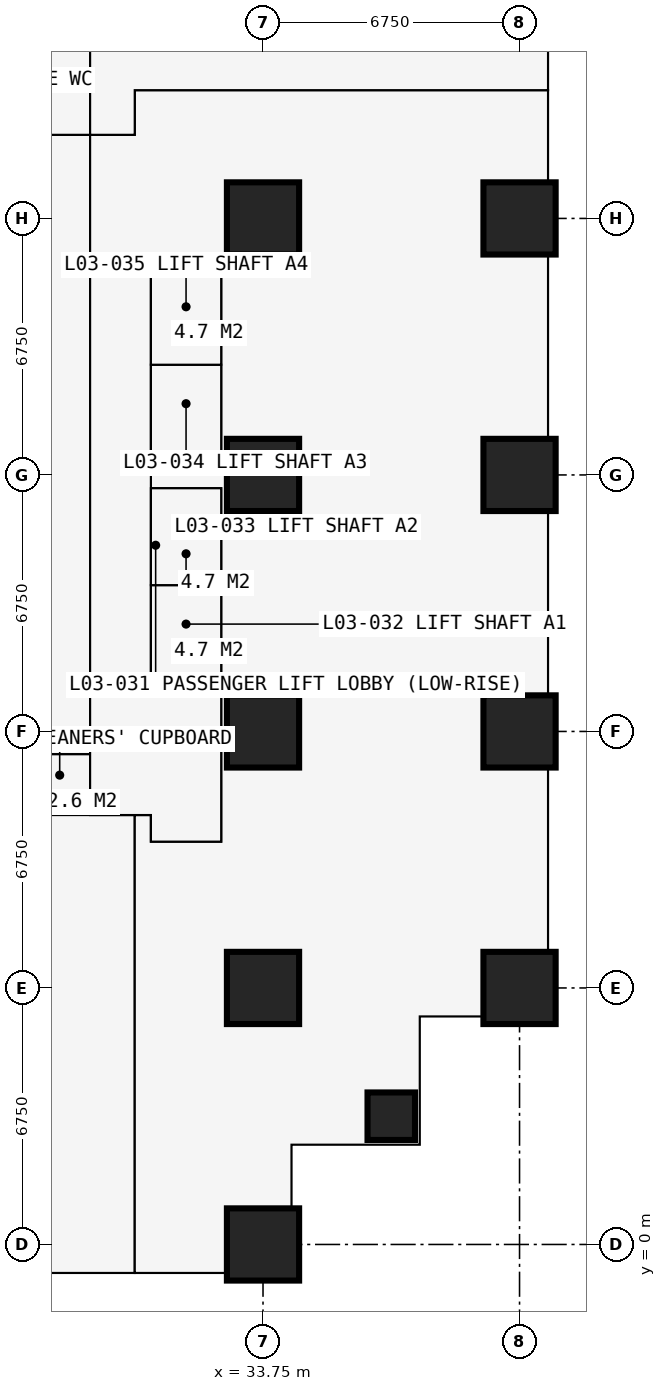
"""IFC4 building model, lengths in metres.
Left out: names, types, materials, properties, quantities, classifications, styles, units other than length and angle.
Written with IfcOpenShell. Run it as: python <this file> out.ifc"""

import sys

from ifc_helpers import new_model, si_unit, direction, frame, frame_2d, origin, origin_2d, place, context, subcontext, project, spatial, rectangle, extrude, element, fill, save


model = new_model("IFC4")
c1 = context("Model", 3, precision=1e-05, world=origin(), true_north=direction((0.0, 1.0)))
c2 = subcontext(c1, "Body", "Model", "MODEL_VIEW")
j1 = project(units=[si_unit("LENGTHUNIT", "METRE"), si_unit("PLANEANGLEUNIT", "RADIAN")], contexts=[c1])
p1 = place(None, origin())
s1 = spatial("IfcSite", under=j1, at=p1, CompositionType="ELEMENT")
p2 = place(p1, origin())
s2 = spatial("IfcBuilding", under=s1, at=p2, CompositionType="ELEMENT")
p3 = place(p2, frame((0.0, 0.0, 13.5)))
s3 = spatial("IfcBuildingStorey", under=s2, at=p3, CompositionType="ELEMENT", Elevation=13.5)
for number, where, z_axis, x_axis in (
    (1, (33.75, 0.0, 0.0), (0.0, 0.0, 1.0), (1.0, 0.0, 0.0)),
    (2, (33.75, 6.75, 0.0), (0.0, 0.0, 1.0), (1.0, 0.0, 0.0)),
    (3, (33.75, 13.5, 0.0), (0.0, 0.0, 1.0), (1.0, 0.0, 0.0)),
    (4, (33.75, 20.25, 0.0), (0.0, 0.0, 1.0), (1.0, 0.0, 0.0)),
    (5, (33.75, 27.0, 0.0), (0.0, 0.0, 1.0), (1.0, 0.0, 0.0)),
):
    element("IfcColumn", number, at=place(p3, frame(where, z_axis=z_axis, x_axis=x_axis)), inside=s3, PredefinedType="COLUMN", context=c2, shape_type="SweptSolid", body=[
        extrude(rectangle(XDim=1.9, YDim=1.9, at=origin_2d()), origin(), (0.0, 0.0, 1.0), 4.5),
    ])
p4 = place(p3, frame((37.125, 3.375, 0.0), z_axis=(0.0, 0.0, 1.0), x_axis=(1.0, 0.0, 0.0)))
e6 = element("IfcColumn", 6, at=p4, inside=s3, PredefinedType="COLUMN", context=c2, shape_type="SweptSolid", body=[
    extrude(rectangle(XDim=1.25, YDim=1.25, at=origin_2d()), origin(), (0.0, 0.0, 1.0), 4.5),
])
for number, where, z_axis, x_axis in (
    (7, (40.5, 6.75, 0.0), (0.0, 0.0, 1.0), (1.0, 0.0, 0.0)),
    (8, (40.5, 13.5, 0.0), (0.0, 0.0, 1.0), (1.0, 0.0, 0.0)),
    (9, (40.5, 20.25, 0.0), (0.0, 0.0, 1.0), (1.0, 0.0, 0.0)),
    (10, (40.5, 27.0, 0.0), (0.0, 0.0, 1.0), (1.0, 0.0, 0.0)),
):
    element("IfcColumn", number, at=place(p3, frame(where, z_axis=z_axis, x_axis=x_axis)), inside=s3, PredefinedType="COLUMN", context=c2, shape_type="SweptSolid", body=[
        extrude(rectangle(XDim=1.9, YDim=1.9, at=origin_2d()), origin(), (0.0, 0.0, 1.0), 4.5),
    ])
p5 = place(p3, frame((41.25, 27.0, 0.0), z_axis=(0.0, 0.0, 1.0), x_axis=(0.0, -1.0, 0.0)))
e11 = element("IfcWall", 11, at=p5, inside=s3, PredefinedType="SOLIDWALL", context=c2, shape_type="SweptSolid", body=[
    extrude(rectangle(XDim=6.75, YDim=0.15, at=frame_2d((3.375, 0.0))), origin(), (0.0, 0.0, 1.0), 4.275),
])
p6 = place(p5, frame((0.962, 0.0, 0.0)))
e12 = element("IfcOpeningElement", 12, at=p6, cuts=e11, PredefinedType="OPENING", context=c2, shape_type="SweptSolid", body=[
    extrude(rectangle(XDim=2.4, YDim=2.4, at=frame_2d((1.2, 1.2))), frame((0.0, 0.085, 0.0), z_axis=(0.0, -1.0, 0.0), x_axis=(1.0, 0.0, 0.0)), (0.0, 0.0, 1.0), 0.17),
])
p7 = place(p5, frame((3.387, 0.0, 0.0)))
e13 = element("IfcOpeningElement", 13, at=p7, cuts=e11, PredefinedType="OPENING", context=c2, shape_type="SweptSolid", body=[
    extrude(rectangle(XDim=2.4, YDim=2.4, at=frame_2d((1.2, 1.2))), frame((0.0, 0.085, 0.0), z_axis=(0.0, -1.0, 0.0), x_axis=(1.0, 0.0, 0.0)), (0.0, 0.0, 1.0), 0.17),
])
p8 = place(p3, frame((34.5, -0.75, 0.0), z_axis=(0.0, 0.0, 1.0), x_axis=(0.0, 1.0, 0.0)))
e14 = element("IfcWall", 14, at=p8, inside=s3, PredefinedType="SOLIDWALL", context=c2, shape_type="SweptSolid", body=[
    extrude(rectangle(XDim=3.375, YDim=0.3, at=frame_2d((1.688, 0.0))), origin(), (0.0, 0.0, 1.0), 4.275),
])
p9 = place(p8, frame((1.857, 0.0, 0.9)))
e15 = element("IfcOpeningElement", 15, at=p9, cuts=e14, PredefinedType="OPENING", context=c2, shape_type="SweptSolid", body=[
    extrude(rectangle(XDim=1.2, YDim=1.8, at=frame_2d((0.6, 0.9))), frame((0.0, 0.16, 0.0), z_axis=(0.0, -1.0, 0.0), x_axis=(1.0, 0.0, 0.0)), (0.0, 0.0, 1.0), 0.32),
])
p10 = place(p3, frame((34.5, 2.625, 0.0), z_axis=(0.0, 0.0, 1.0), x_axis=(1.0, 0.0, 0.0)))
e16 = element("IfcWall", 16, at=p10, inside=s3, PredefinedType="SOLIDWALL", context=c2, shape_type="SweptSolid", body=[
    extrude(rectangle(XDim=3.375, YDim=0.3, at=frame_2d((1.688, 0.0))), origin(), (0.0, 0.0, 1.0), 4.275),
])
p11 = place(p10, frame((0.938, 0.0, 0.9)))
e17 = element("IfcOpeningElement", 17, at=p11, cuts=e16, PredefinedType="OPENING", context=c2, shape_type="SweptSolid", body=[
    extrude(rectangle(XDim=1.5, YDim=1.8, at=frame_2d((0.75, 0.9))), frame((0.0, 0.16, 0.0), z_axis=(0.0, -1.0, 0.0), x_axis=(1.0, 0.0, 0.0)), (0.0, 0.0, 1.0), 0.32),
])
p12 = place(p3, frame((37.875, 2.625, 0.0), z_axis=(0.0, 0.0, 1.0), x_axis=(0.0, 1.0, 0.0)))
e18 = element("IfcWall", 18, at=p12, inside=s3, PredefinedType="SOLIDWALL", context=c2, shape_type="SweptSolid", body=[
    extrude(rectangle(XDim=3.375, YDim=0.3, at=frame_2d((1.688, 0.0))), origin(), (0.0, 0.0, 1.0), 4.275),
])
p13 = place(p12, frame((0.938, 0.0, 0.9)))
e19 = element("IfcOpeningElement", 19, at=p13, cuts=e18, PredefinedType="OPENING", context=c2, shape_type="SweptSolid", body=[
    extrude(rectangle(XDim=1.5, YDim=1.8, at=frame_2d((0.75, 0.9))), frame((0.0, 0.16, 0.0), z_axis=(0.0, -1.0, 0.0), x_axis=(1.0, 0.0, 0.0)), (0.0, 0.0, 1.0), 0.32),
])
p14 = place(p3, frame((37.875, 6.0, 0.0), z_axis=(0.0, 0.0, 1.0), x_axis=(1.0, 0.0, 0.0)))
e20 = element("IfcWall", 20, at=p14, inside=s3, PredefinedType="SOLIDWALL", context=c2, shape_type="SweptSolid", body=[
    extrude(rectangle(XDim=3.375, YDim=0.3, at=frame_2d((1.688, 0.0))), origin(), (0.0, 0.0, 1.0), 4.275),
])
p15 = place(p14, frame((0.317, 0.0, 0.9)))
e21 = element("IfcOpeningElement", 21, at=p15, cuts=e20, PredefinedType="OPENING", context=c2, shape_type="SweptSolid", body=[
    extrude(rectangle(XDim=1.2, YDim=1.8, at=frame_2d((0.6, 0.9))), frame((0.0, 0.16, 0.0), z_axis=(0.0, -1.0, 0.0), x_axis=(1.0, 0.0, 0.0)), (0.0, 0.0, 1.0), 0.32),
])
p16 = place(p3, frame((8.9, 29.2, 0.0), z_axis=(0.0, 0.0, 1.0), x_axis=(1.0, 0.0, 0.0)))
e22 = element("IfcWall", 22, at=p16, inside=s3, PredefinedType="PARTITIONING", context=c2, shape_type="SweptSolid", body=[
    extrude(rectangle(XDim=21.475, YDim=0.15, at=frame_2d((10.738, 0.0))), origin(), (0.0, 0.0, 1.0), 4.275),
])
p17 = place(p16, frame((16.65, 0.0, 0.0)))
e23 = element("IfcOpeningElement", 23, at=p17, cuts=e22, PredefinedType="OPENING", context=c2, shape_type="SweptSolid", body=[
    extrude(rectangle(XDim=1.0, YDim=2.2, at=frame_2d((0.5, 1.1))), frame((0.0, 0.085, 0.0), z_axis=(0.0, -1.0, 0.0), x_axis=(1.0, 0.0, 0.0)), (0.0, 0.0, 1.0), 0.17),
])
p18 = place(p16, frame((18.75, 0.0, 0.0)))
e24 = element("IfcOpeningElement", 24, at=p18, cuts=e22, PredefinedType="OPENING", context=c2, shape_type="SweptSolid", body=[
    extrude(rectangle(XDim=1.0, YDim=2.2, at=frame_2d((0.5, 1.1))), frame((0.0, 0.085, 0.0), z_axis=(0.0, -1.0, 0.0), x_axis=(1.0, 0.0, 0.0)), (0.0, 0.0, 1.0), 0.17),
])
p19 = place(p16, frame((8.45, 0.0, 0.0)))
e25 = element("IfcOpeningElement", 25, at=p19, cuts=e22, PredefinedType="OPENING", context=c2, shape_type="SweptSolid", body=[
    extrude(rectangle(XDim=1.6, YDim=2.4, at=frame_2d((0.8, 1.2))), frame((0.0, 0.085, 0.0), z_axis=(0.0, -1.0, 0.0), x_axis=(1.0, 0.0, 0.0)), (0.0, 0.0, 1.0), 0.17),
])
p20 = place(p3, frame((10.125, 11.3, 0.0), z_axis=(0.0, 0.0, 1.0), x_axis=(1.0, 0.0, 0.0)))
e26 = element("IfcWall", 26, at=p20, inside=s3, PredefinedType="PARTITIONING", context=c2, shape_type="SweptSolid", body=[
    extrude(rectangle(XDim=20.675, YDim=0.15, at=frame_2d((10.337, 0.0))), origin(), (0.0, 0.0, 1.0), 4.275),
])
p21 = place(p20, frame((1.725, 0.0, 0.0)))
e27 = element("IfcOpeningElement", 27, at=p21, cuts=e26, PredefinedType="OPENING", context=c2, shape_type="SweptSolid", body=[
    extrude(rectangle(XDim=1.0, YDim=2.2, at=frame_2d((0.5, 1.1))), frame((0.0, 0.085, 0.0), z_axis=(0.0, -1.0, 0.0), x_axis=(1.0, 0.0, 0.0)), (0.0, 0.0, 1.0), 0.17),
])
p22 = place(p20, frame((3.825, 0.0, 0.0)))
e28 = element("IfcOpeningElement", 28, at=p22, cuts=e26, PredefinedType="OPENING", context=c2, shape_type="SweptSolid", body=[
    extrude(rectangle(XDim=1.0, YDim=2.2, at=frame_2d((0.5, 1.1))), frame((0.0, 0.085, 0.0), z_axis=(0.0, -1.0, 0.0), x_axis=(1.0, 0.0, 0.0)), (0.0, 0.0, 1.0), 0.17),
])
p23 = place(p20, frame((10.625, 0.0, 0.0)))
e29 = element("IfcOpeningElement", 29, at=p23, cuts=e26, PredefinedType="OPENING", context=c2, shape_type="SweptSolid", body=[
    extrude(rectangle(XDim=1.6, YDim=2.4, at=frame_2d((0.8, 1.2))), frame((0.0, 0.085, 0.0), z_axis=(0.0, -1.0, 0.0), x_axis=(1.0, 0.0, 0.0)), (0.0, 0.0, 1.0), 0.17),
])
p24 = place(p3, frame((27.6, 12.9, 0.0), z_axis=(0.0, 0.0, 1.0), x_axis=(1.0, 0.0, 0.0)))
e30 = element("IfcWall", 30, at=p24, inside=s3, PredefinedType="PARTITIONING", context=c2, shape_type="SweptSolid", body=[
    extrude(rectangle(XDim=1.6, YDim=0.15, at=frame_2d((0.8, 0.0))), origin(), (0.0, 0.0, 1.0), 3.777),
])
p25 = place(p3, frame((29.2, 11.3, 0.0), z_axis=(0.0, 0.0, 1.0), x_axis=(0.0, 1.0, 0.0)))
e31 = element("IfcWall", 31, at=p25, inside=s3, PredefinedType="PARTITIONING", context=c2, shape_type="SweptSolid", body=[
    extrude(rectangle(XDim=20.3, YDim=0.15, at=frame_2d((10.15, 0.0))), origin(), (0.0, 0.0, 1.0), 4.275),
])
p26 = place(p25, frame((15.35, 0.0, 0.0)))
e32 = element("IfcOpeningElement", 32, at=p26, cuts=e31, PredefinedType="OPENING", context=c2, shape_type="SweptSolid", body=[
    extrude(rectangle(XDim=1.6, YDim=2.4, at=frame_2d((0.8, 1.2))), frame((0.0, 0.085, 0.0), z_axis=(0.0, -1.0, 0.0), x_axis=(1.0, 0.0, 0.0)), (0.0, 0.0, 1.0), 0.17),
])
p27 = place(p25, frame((8.35, 0.0, 0.0)))
e33 = element("IfcOpeningElement", 33, at=p27, cuts=e31, PredefinedType="OPENING", context=c2, shape_type="SweptSolid", body=[
    extrude(rectangle(XDim=1.2, YDim=2.2, at=frame_2d((0.6, 1.1))), frame((0.0, 0.085, 0.0), z_axis=(0.0, -1.0, 0.0), x_axis=(1.0, 0.0, 0.0)), (0.0, 0.0, 1.0), 0.17),
])
p28 = place(p3, frame((29.2, 25.7, 0.0), z_axis=(0.0, 0.0, 1.0), x_axis=(1.0, 0.0, 0.0)))
e34 = element("IfcWall", 34, at=p28, inside=s3, PredefinedType="SHEAR", context=c2, shape_type="SweptSolid", body=[
    extrude(rectangle(XDim=3.45, YDim=0.1, at=frame_2d((1.725, 0.0))), origin(), (0.0, 0.0, 1.0), 4.275),
])
p29 = place(p3, frame((30.375, -0.734, 0.0), z_axis=(0.0, 0.0, 1.0), x_axis=(0.0, 1.0, 0.0)))
e35 = element("IfcWall", 35, at=p29, inside=s3, PredefinedType="PARTITIONING", context=c2, shape_type="SweptSolid", body=[
    extrude(rectangle(XDim=12.034, YDim=0.15, at=frame_2d((6.017, 0.0))), origin(), (0.0, 0.0, 1.0), 4.275),
])
p30 = place(p3, frame((30.375, 29.2, 0.0), z_axis=(0.0, 0.0, 1.0), x_axis=(0.0, 1.0, 0.0)))
e36 = element("IfcWall", 36, at=p30, inside=s3, PredefinedType="PARTITIONING", context=c2, shape_type="SweptSolid", body=[
    extrude(rectangle(XDim=1.175, YDim=0.15, at=frame_2d((0.587, 0.0))), origin(), (0.0, 0.0, 1.0), 4.275),
])
p31 = place(p3, frame((30.375, 30.375, 0.0), z_axis=(0.0, 0.0, 1.0), x_axis=(1.0, 0.0, 0.0)))
e37 = element("IfcWall", 37, at=p31, inside=s3, PredefinedType="PARTITIONING", context=c2, shape_type="SweptSolid", body=[
    extrude(rectangle(XDim=10.859, YDim=0.15, at=frame_2d((5.429, 0.0))), origin(), (0.0, 0.0, 1.0), 4.275),
])
p32 = place(p3, frame((30.8, 10.6, 0.0), z_axis=(0.0, 0.0, 1.0), x_axis=(0.0, 1.0, 0.0)))
e38 = element("IfcWall", 38, at=p32, inside=s3, PredefinedType="PARTITIONING", context=c2, shape_type="SweptSolid", body=[
    extrude(rectangle(XDim=0.7, YDim=0.15, at=frame_2d((0.35, 0.0))), origin(), (0.0, 0.0, 1.0), 4.275),
])
p33 = place(p3, frame((30.8, 10.6, 0.0), z_axis=(0.0, 0.0, 1.0), x_axis=(1.0, 0.0, 0.0)))
e39 = element("IfcWall", 39, at=p33, inside=s3, PredefinedType="PARTITIONING", context=c2, shape_type="SweptSolid", body=[
    extrude(rectangle(XDim=1.85, YDim=0.15, at=frame_2d((0.925, 0.0))), origin(), (0.0, 0.0, 1.0), 4.275),
])
p34 = place(p3, frame((30.8, 14.8, 0.0), z_axis=(0.0, 0.0, 1.0), x_axis=(0.0, 1.0, 0.0)))
e40 = element("IfcWall", 40, at=p34, inside=s3, PredefinedType="PARTITIONING", context=c2, shape_type="SweptSolid", body=[
    extrude(rectangle(XDim=10.9, YDim=0.15, at=frame_2d((5.45, 0.0))), origin(), (0.0, 0.0, 1.0), 4.275),
])
p35 = place(p34, frame((0.75, 0.0, 0.0)))
e41 = element("IfcOpeningElement", 41, at=p35, cuts=e40, PredefinedType="OPENING", context=c2, shape_type="SweptSolid", body=[
    extrude(rectangle(XDim=1.1, YDim=2.2, at=frame_2d((0.55, 1.1))), frame((0.0, 0.085, 0.0), z_axis=(0.0, -1.0, 0.0), x_axis=(1.0, 0.0, 0.0)), (0.0, 0.0, 1.0), 0.17),
])
p36 = place(p34, frame((3.25, 0.0, 0.0)))
e42 = element("IfcOpeningElement", 42, at=p36, cuts=e40, PredefinedType="OPENING", context=c2, shape_type="SweptSolid", body=[
    extrude(rectangle(XDim=1.1, YDim=2.2, at=frame_2d((0.55, 1.1))), frame((0.0, 0.085, 0.0), z_axis=(0.0, -1.0, 0.0), x_axis=(1.0, 0.0, 0.0)), (0.0, 0.0, 1.0), 0.17),
])
p37 = place(p34, frame((6.5, 0.0, 0.0)))
e43 = element("IfcOpeningElement", 43, at=p37, cuts=e40, PredefinedType="OPENING", context=c2, shape_type="SweptSolid", body=[
    extrude(rectangle(XDim=1.1, YDim=2.2, at=frame_2d((0.55, 1.1))), frame((0.0, 0.085, 0.0), z_axis=(0.0, -1.0, 0.0), x_axis=(1.0, 0.0, 0.0)), (0.0, 0.0, 1.0), 0.17),
])
p38 = place(p34, frame((9.05, 0.0, 0.0)))
e44 = element("IfcOpeningElement", 44, at=p38, cuts=e40, PredefinedType="OPENING", context=c2, shape_type="SweptSolid", body=[
    extrude(rectangle(XDim=1.1, YDim=2.2, at=frame_2d((0.55, 1.1))), frame((0.0, 0.085, 0.0), z_axis=(0.0, -1.0, 0.0), x_axis=(1.0, 0.0, 0.0)), (0.0, 0.0, 1.0), 0.17),
])
for number, where, z_axis, x_axis in (
    (45, (30.8, 14.8, 0.0), (0.0, 0.0, 1.0), (1.0, 0.0, 0.0)),
    (46, (30.8, 17.35, 0.0), (0.0, 0.0, 1.0), (1.0, 0.0, 0.0)),
    (47, (30.8, 19.9, 0.0), (0.0, 0.0, 1.0), (1.0, 0.0, 0.0)),
    (48, (30.8, 20.6, 0.0), (0.0, 0.0, 1.0), (1.0, 0.0, 0.0)),
    (49, (30.8, 23.15, 0.0), (0.0, 0.0, 1.0), (1.0, 0.0, 0.0)),
):
    element("IfcWall", number, at=place(p3, frame(where, z_axis=z_axis, x_axis=x_axis)), inside=s3, PredefinedType="SHEAR", context=c2, shape_type="SweptSolid", body=[
        extrude(rectangle(XDim=1.85, YDim=0.1, at=frame_2d((0.925, 0.0))), origin(), (0.0, 0.0, 1.0), 4.275),
    ])
p39 = place(p3, frame((32.65, 10.6, 0.0), z_axis=(0.0, 0.0, 1.0), x_axis=(0.0, 1.0, 0.0)))
e50 = element("IfcWall", 50, at=p39, inside=s3, PredefinedType="SHEAR", context=c2, shape_type="SweptSolid", body=[
    extrude(rectangle(XDim=9.3, YDim=0.1, at=frame_2d((4.65, 0.0))), origin(), (0.0, 0.0, 1.0), 4.275),
])
p40 = place(p3, frame((32.65, 20.6, 0.0), z_axis=(0.0, 0.0, 1.0), x_axis=(0.0, 1.0, 0.0)))
e51 = element("IfcWall", 51, at=p40, inside=s3, PredefinedType="PARTITIONING", context=c2, shape_type="SweptSolid", body=[
    extrude(rectangle(XDim=5.1, YDim=0.15, at=frame_2d((2.55, 0.0))), origin(), (0.0, 0.0, 1.0), 4.275),
])
p41 = place(p6, origin())
e52 = element("IfcDoor", 52, at=p41, inside=s3, OperationType="SLIDING_TO_LEFT", PredefinedType="DOOR", context=c2, shape_type="SweptSolid", body=[
    extrude(rectangle(XDim=2.4, YDim=2.4, at=frame_2d((1.2, 1.2))), frame((0.0, 0.025, 0.0), z_axis=(0.0, -1.0, 0.0), x_axis=(1.0, 0.0, 0.0)), (0.0, 0.0, 1.0), 0.05),
])
fill(e12, e52)
p42 = place(p7, origin())
e53 = element("IfcDoor", 53, at=p42, inside=s3, OperationType="SLIDING_TO_LEFT", PredefinedType="DOOR", context=c2, shape_type="SweptSolid", body=[
    extrude(rectangle(XDim=2.4, YDim=2.4, at=frame_2d((1.2, 1.2))), frame((0.0, 0.025, 0.0), z_axis=(0.0, -1.0, 0.0), x_axis=(1.0, 0.0, 0.0)), (0.0, 0.0, 1.0), 0.05),
])
fill(e13, e53)
p43 = place(p9, origin())
e54 = element("IfcWindow", 54, at=p43, inside=s3, PartitioningType="SINGLE_PANEL", PredefinedType="WINDOW", context=c2, shape_type="SweptSolid", body=[
    extrude(rectangle(XDim=1.2, YDim=1.8, at=frame_2d((0.6, 0.9))), frame((0.0, 0.03, 0.0), z_axis=(0.0, -1.0, 0.0), x_axis=(1.0, 0.0, 0.0)), (0.0, 0.0, 1.0), 0.06),
])
fill(e15, e54)
p44 = place(p11, origin())
e55 = element("IfcWindow", 55, at=p44, inside=s3, PartitioningType="SINGLE_PANEL", PredefinedType="WINDOW", context=c2, shape_type="SweptSolid", body=[
    extrude(rectangle(XDim=1.5, YDim=1.8, at=frame_2d((0.75, 0.9))), frame((0.0, 0.03, 0.0), z_axis=(0.0, -1.0, 0.0), x_axis=(1.0, 0.0, 0.0)), (0.0, 0.0, 1.0), 0.06),
])
fill(e17, e55)
p45 = place(p13, origin())
e56 = element("IfcWindow", 56, at=p45, inside=s3, PartitioningType="SINGLE_PANEL", PredefinedType="WINDOW", context=c2, shape_type="SweptSolid", body=[
    extrude(rectangle(XDim=1.5, YDim=1.8, at=frame_2d((0.75, 0.9))), frame((0.0, 0.03, 0.0), z_axis=(0.0, -1.0, 0.0), x_axis=(1.0, 0.0, 0.0)), (0.0, 0.0, 1.0), 0.06),
])
fill(e19, e56)
p46 = place(p15, origin())
e57 = element("IfcWindow", 57, at=p46, inside=s3, PartitioningType="SINGLE_PANEL", PredefinedType="WINDOW", context=c2, shape_type="SweptSolid", body=[
    extrude(rectangle(XDim=1.2, YDim=1.8, at=frame_2d((0.6, 0.9))), frame((0.0, 0.03, 0.0), z_axis=(0.0, -1.0, 0.0), x_axis=(1.0, 0.0, 0.0)), (0.0, 0.0, 1.0), 0.06),
])
fill(e21, e57)
p47 = place(p26, origin())
e58 = element("IfcDoor", 58, at=p47, inside=s3, OperationType="DOUBLE_DOOR_SINGLE_SWING", PredefinedType="DOOR", context=c2, shape_type="SweptSolid", body=[
    extrude(rectangle(XDim=1.6, YDim=2.4, at=frame_2d((0.8, 1.2))), frame((0.0, 0.025, 0.0), z_axis=(0.0, -1.0, 0.0), x_axis=(1.0, 0.0, 0.0)), (0.0, 0.0, 1.0), 0.05),
])
fill(e32, e58)
p48 = place(p18, origin())
e59 = element("IfcDoor", 59, at=p48, inside=s3, OperationType="SINGLE_SWING_LEFT", PredefinedType="DOOR", context=c2, shape_type="SweptSolid", body=[
    extrude(rectangle(XDim=1.0, YDim=2.2, at=frame_2d((0.5, 1.1))), frame((0.0, 0.025, 0.0), z_axis=(0.0, -1.0, 0.0), x_axis=(1.0, 0.0, 0.0)), (0.0, 0.0, 1.0), 0.05),
])
fill(e24, e59)
p49 = place(p35, origin())
e60 = element("IfcDoor", 60, at=p49, inside=s3, OperationType="DOUBLE_DOOR_SLIDING", PredefinedType="DOOR", context=c2, shape_type="SweptSolid", body=[
    extrude(rectangle(XDim=1.1, YDim=2.2, at=frame_2d((0.55, 1.1))), frame((0.0, 0.025, 0.0), z_axis=(0.0, -1.0, 0.0), x_axis=(1.0, 0.0, 0.0)), (0.0, 0.0, 1.0), 0.05),
])
fill(e41, e60)
p50 = place(p36, origin())
e61 = element("IfcDoor", 61, at=p50, inside=s3, OperationType="DOUBLE_DOOR_SLIDING", PredefinedType="DOOR", context=c2, shape_type="SweptSolid", body=[
    extrude(rectangle(XDim=1.1, YDim=2.2, at=frame_2d((0.55, 1.1))), frame((0.0, 0.025, 0.0), z_axis=(0.0, -1.0, 0.0), x_axis=(1.0, 0.0, 0.0)), (0.0, 0.0, 1.0), 0.05),
])
fill(e42, e61)
p51 = place(p37, origin())
e62 = element("IfcDoor", 62, at=p51, inside=s3, OperationType="DOUBLE_DOOR_SLIDING", PredefinedType="DOOR", context=c2, shape_type="SweptSolid", body=[
    extrude(rectangle(XDim=1.1, YDim=2.2, at=frame_2d((0.55, 1.1))), frame((0.0, 0.025, 0.0), z_axis=(0.0, -1.0, 0.0), x_axis=(1.0, 0.0, 0.0)), (0.0, 0.0, 1.0), 0.05),
])
fill(e43, e62)
p52 = place(p38, origin())
e63 = element("IfcDoor", 63, at=p52, inside=s3, OperationType="DOUBLE_DOOR_SLIDING", PredefinedType="DOOR", context=c2, shape_type="SweptSolid", body=[
    extrude(rectangle(XDim=1.1, YDim=2.2, at=frame_2d((0.55, 1.1))), frame((0.0, 0.025, 0.0), z_axis=(0.0, -1.0, 0.0), x_axis=(1.0, 0.0, 0.0)), (0.0, 0.0, 1.0), 0.05),
])
fill(e44, e63)
p53 = place(p27, origin())
e64 = element("IfcDoor", 64, at=p53, inside=s3, OperationType="DOUBLE_DOOR_SINGLE_SWING", PredefinedType="DOOR", context=c2, shape_type="SweptSolid", body=[
    extrude(rectangle(XDim=1.2, YDim=2.2, at=frame_2d((0.6, 1.1))), frame((0.0, 0.025, 0.0), z_axis=(0.0, -1.0, 0.0), x_axis=(1.0, 0.0, 0.0)), (0.0, 0.0, 1.0), 0.05),
])
fill(e33, e64)
save(model, sys.argv[1])
